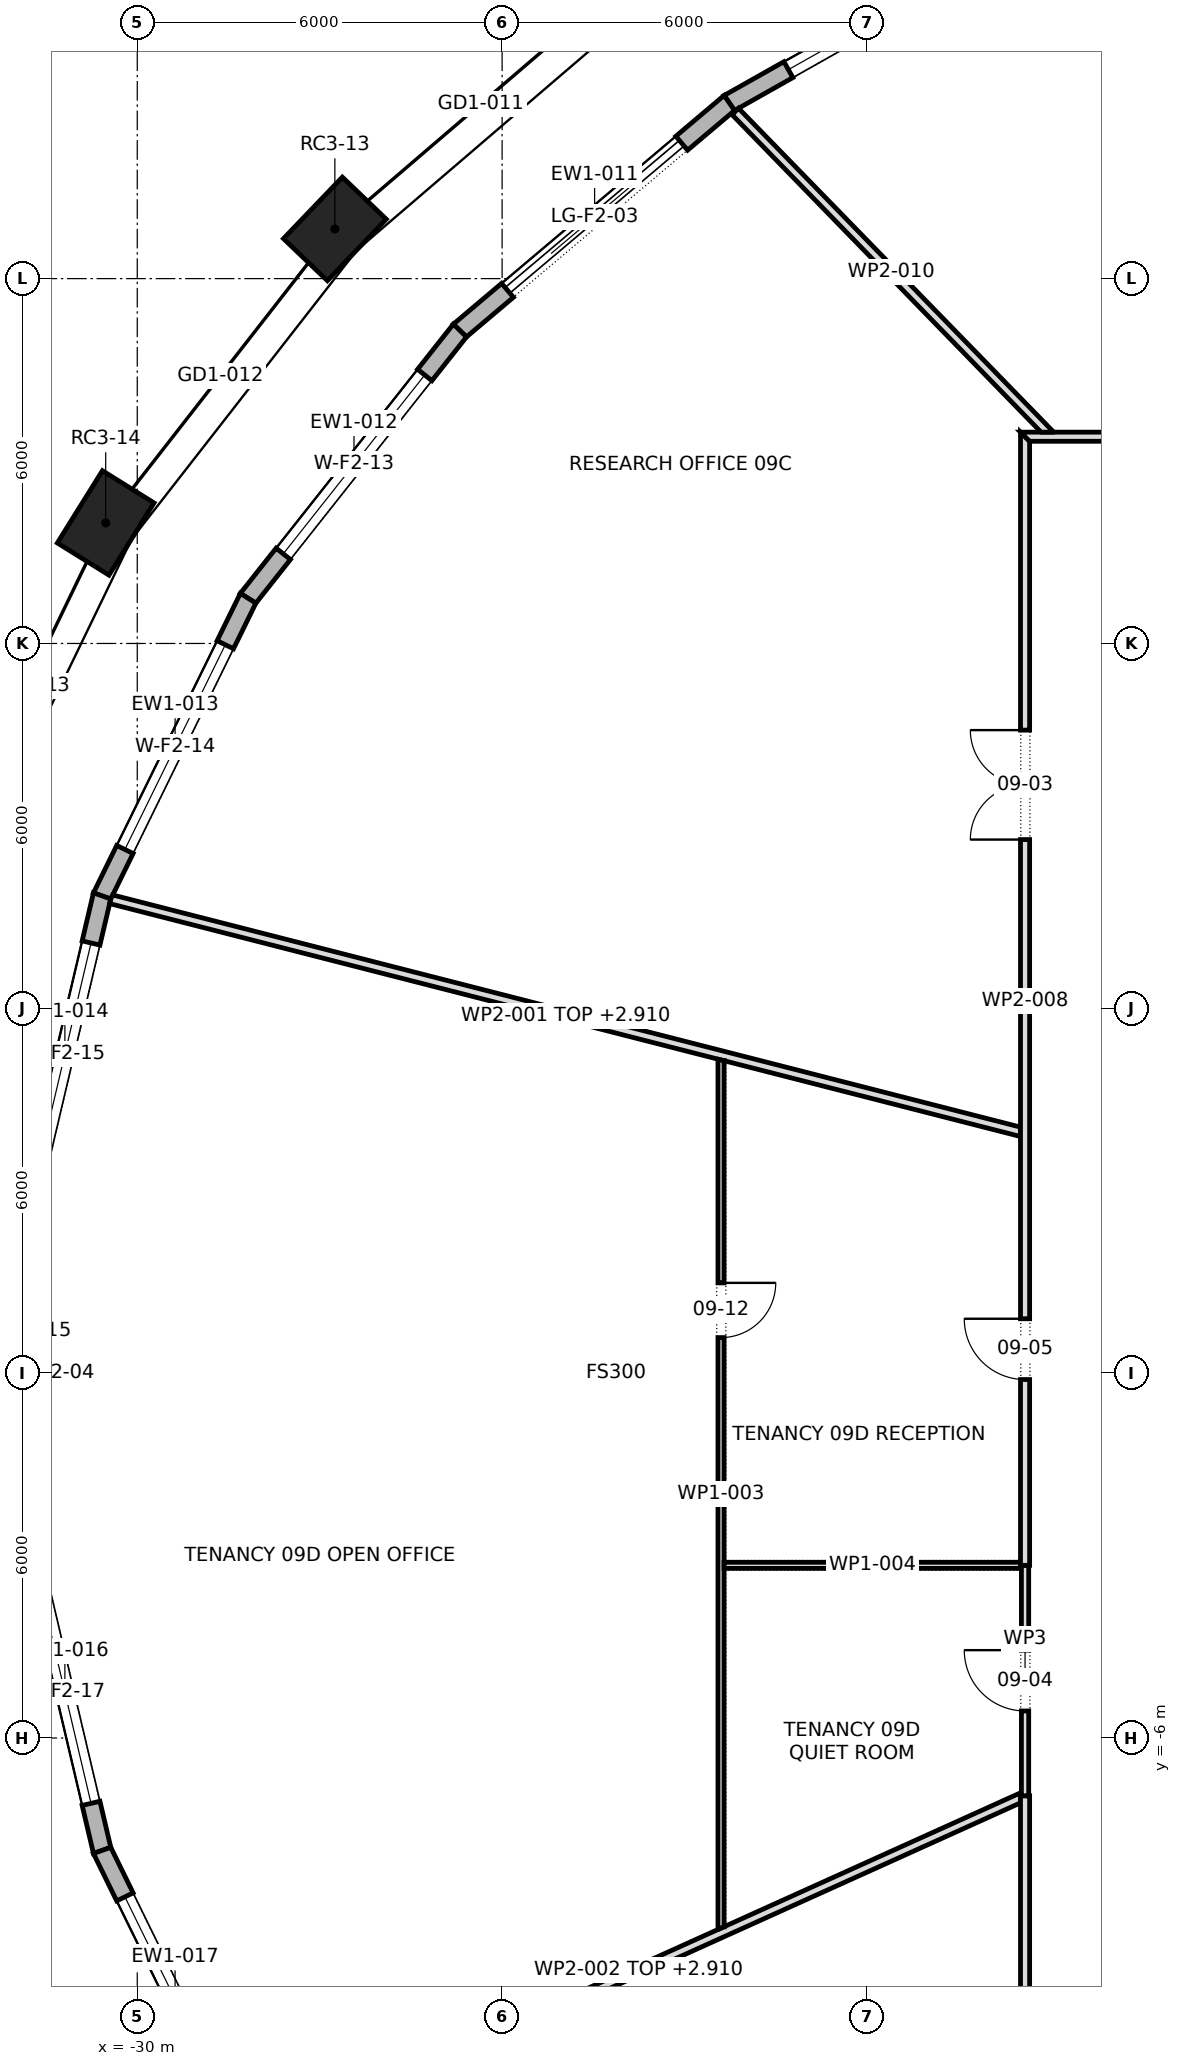
"""IFC4 building model, lengths in metres.
Left out: names, types, materials, properties, quantities, classifications, styles, units other than length and angle.
Written with IfcOpenShell. Run it as: python <this file> out.ifc"""

import sys

from ifc_helpers import new_model, si_unit, direction, frame, frame_2d, origin, origin_2d, place, context, subcontext, project, spatial, polyline, rectangle, outline, extrude, element, fill, save


model = new_model("IFC4")
c1 = context("Model", 3, precision=1e-05, world=origin(), true_north=direction((0.0, 1.0)))
c2 = subcontext(c1, "Body", "Model", "MODEL_VIEW")
j1 = project(units=[si_unit("LENGTHUNIT", "METRE"), si_unit("PLANEANGLEUNIT", "RADIAN")], contexts=[c1])
p1 = place(None, origin())
s1 = spatial("IfcSite", under=j1, at=p1, CompositionType="ELEMENT")
p2 = place(p1, origin())
s2 = spatial("IfcBuilding", under=s1, at=p2, CompositionType="ELEMENT")
p3 = place(p2, frame((0.0, 0.0, 129.7)))
s3 = spatial("IfcBuildingStorey", under=s2, at=p3, CompositionType="ELEMENT", Elevation=129.7)
for number, where, z_axis, x_axis in (
    (1, (-26.75, 18.817, 0.0), (0.0, 0.0, 1.0), (-0.692, -0.722, 0.0)),
    (2, (-30.519, 13.982, 0.0), (0.0, 0.0, 1.0), (-0.529, -0.849, 0.0)),
):
    element("IfcColumn", number, at=place(p3, frame(where, z_axis=z_axis, x_axis=x_axis)), inside=s3, PredefinedType="COLUMN", context=c2, shape_type="SweptSolid", body=[
        extrude(rectangle(XDim=1.4, YDim=1.0, at=origin_2d()), origin(), (0.0, 0.0, 1.0), 4.2),
    ])
p4 = place(p3, frame((-15.055, 23.827, 0.0), z_axis=(0.0, 0.0, 1.0), x_axis=(-0.87090857883, -0.491445060327, 0.0)))
e3 = element("IfcWall", 3, at=p4, inside=s3, PredefinedType="STANDARD", context=c2, shape_type="SweptSolid", body=[
    extrude(outline(polyline([(-0.013, -0.15), (5.994, -0.15), (5.966, 0.15), (0.013, 0.15), (-0.013, -0.15)])), origin(), (0.0, 0.0, 1.0), 3.9),
])
p5 = place(p4, frame((1.115, 0.0, 0.6)))
e4 = element("IfcOpeningElement", 4, at=p5, cuts=e3, PredefinedType="OPENING", context=c2, shape_type="SweptSolid", body=[
    extrude(rectangle(XDim=3.75, YDim=2.85, at=frame_2d((1.875, 1.425))), frame((0.0, 0.162, 0.0), z_axis=(0.0, -1.0, 0.0), x_axis=(1.0, 0.0, 0.0)), (0.0, 0.0, 1.0), 0.324),
])
p6 = place(p3, frame((-20.263, 20.888, 0.0), z_axis=(0.0, 0.0, 1.0), x_axis=(-0.763963973896, -0.645258898884, 0.0)))
e5 = element("IfcWall", 5, at=p6, inside=s3, PredefinedType="STANDARD", context=c2, shape_type="SweptSolid", body=[
    extrude(outline(polyline([(-0.014, -0.15), (5.815, -0.15), (5.785, 0.15), (0.014, 0.15), (-0.014, -0.15)])), origin(), (0.0, 0.0, 1.0), 3.9),
])
p7 = place(p6, frame((1.025, 0.0, 0.0)))
e6 = element("IfcOpeningElement", 6, at=p7, cuts=e5, PredefinedType="OPENING", context=c2, shape_type="SweptSolid", body=[
    extrude(rectangle(XDim=3.75, YDim=3.45, at=frame_2d((1.875, 1.725))), frame((0.0, 0.162, 0.0), z_axis=(0.0, -1.0, 0.0), x_axis=(1.0, 0.0, 0.0)), (0.0, 0.0, 1.0), 0.324),
])
p8 = place(p3, frame((-24.694, 17.146, 0.0), z_axis=(0.0, 0.0, 1.0), x_axis=(-0.620464552431, -0.784234492468, 0.0)))
e7 = element("IfcWall", 7, at=p8, inside=s3, PredefinedType="STANDARD", context=c2, shape_type="SweptSolid", body=[
    extrude(outline(polyline([(-0.015, -0.15), (5.63, -0.15), (5.598, 0.15), (0.015, 0.15), (-0.015, -0.15)])), origin(), (0.0, 0.0, 1.0), 3.9),
])
p9 = place(p8, frame((0.932, 0.0, 0.6)))
e8 = element("IfcOpeningElement", 8, at=p9, cuts=e7, PredefinedType="OPENING", context=c2, shape_type="SweptSolid", body=[
    extrude(rectangle(XDim=3.75, YDim=2.85, at=frame_2d((1.875, 1.425))), frame((0.0, 0.162, 0.0), z_axis=(0.0, -1.0, 0.0), x_axis=(1.0, 0.0, 0.0)), (0.0, 0.0, 1.0), 0.324),
])
p10 = place(p3, frame((-28.177, 12.743, 0.0), z_axis=(0.0, 0.0, 1.0), x_axis=(-0.440321465864, -0.897840189956, 0.0)))
e9 = element("IfcWall", 9, at=p10, inside=s3, PredefinedType="STANDARD", context=c2, shape_type="SweptSolid", body=[
    extrude(outline(polyline([(-0.016, -0.15), (5.468, -0.15), (5.435, 0.15), (0.016, 0.15), (-0.016, -0.15)])), origin(), (0.0, 0.0, 1.0), 3.9),
])
p11 = place(p10, frame((0.851, 0.0, 0.6)))
e10 = element("IfcOpeningElement", 10, at=p11, cuts=e9, PredefinedType="OPENING", context=c2, shape_type="SweptSolid", body=[
    extrude(rectangle(XDim=3.75, YDim=2.85, at=frame_2d((1.875, 1.425))), frame((0.0, 0.162, 0.0), z_axis=(0.0, -1.0, 0.0), x_axis=(1.0, 0.0, 0.0)), (0.0, 0.0, 1.0), 0.324),
])
p12 = place(p3, frame((-30.578, 7.848, 0.0), z_axis=(0.0, 0.0, 1.0), x_axis=(-0.229227895667, -0.973372781543, 0.0)))
e11 = element("IfcWall", 11, at=p12, inside=s3, PredefinedType="STANDARD", context=c2, shape_type="SweptSolid", body=[
    extrude(outline(polyline([(-0.017, -0.15), (5.357, -0.15), (5.323, 0.15), (0.017, 0.15), (-0.017, -0.15)])), origin(), (0.0, 0.0, 1.0), 3.9),
])
p13 = place(p12, frame((0.795, 0.0, 0.6)))
e12 = element("IfcOpeningElement", 12, at=p13, cuts=e11, PredefinedType="OPENING", context=c2, shape_type="SweptSolid", body=[
    extrude(rectangle(XDim=3.75, YDim=2.85, at=frame_2d((1.875, 1.425))), frame((0.0, 0.162, 0.0), z_axis=(0.0, -1.0, 0.0), x_axis=(1.0, 0.0, 0.0)), (0.0, 0.0, 1.0), 0.324),
])
p14 = place(p3, frame((-31.802, -2.65, 0.0), z_axis=(0.0, 0.0, 1.0), x_axis=(0.229227895667, -0.973372781543, 0.0)))
e13 = element("IfcWall", 13, at=p14, inside=s3, PredefinedType="STANDARD", context=c2, shape_type="SweptSolid", body=[
    extrude(outline(polyline([(-0.017, -0.15), (5.357, -0.15), (5.323, 0.15), (0.017, 0.15), (-0.017, -0.15)])), origin(), (0.0, 0.0, 1.0), 3.9),
])
p15 = place(p14, frame((0.795, 0.0, 0.6)))
e14 = element("IfcOpeningElement", 14, at=p15, cuts=e13, PredefinedType="OPENING", context=c2, shape_type="SweptSolid", body=[
    extrude(rectangle(XDim=3.75, YDim=2.85, at=frame_2d((1.875, 1.425))), frame((0.0, 0.162, 0.0), z_axis=(0.0, -1.0, 0.0), x_axis=(1.0, 0.0, 0.0)), (0.0, 0.0, 1.0), 0.324),
])
p16 = place(p3, frame((-30.578, -7.848, 0.0), z_axis=(0.0, 0.0, 1.0), x_axis=(0.440321465864, -0.897840189956, 0.0)))
e15 = element("IfcWall", 15, at=p16, inside=s3, PredefinedType="STANDARD", context=c2, shape_type="SweptSolid", body=[
    extrude(outline(polyline([(-0.017, -0.15), (5.468, -0.15), (5.435, 0.15), (0.017, 0.15), (-0.017, -0.15)])), origin(), (0.0, 0.0, 1.0), 3.9),
])
p17 = place(p16, frame((0.851, 0.0, 0.6)))
e16 = element("IfcOpeningElement", 16, at=p17, cuts=e15, PredefinedType="OPENING", context=c2, shape_type="SweptSolid", body=[
    extrude(rectangle(XDim=3.75, YDim=2.85, at=frame_2d((1.875, 1.425))), frame((0.0, 0.162, 0.0), z_axis=(0.0, -1.0, 0.0), x_axis=(1.0, 0.0, 0.0)), (0.0, 0.0, 1.0), 0.324),
])
p18 = place(p3, frame((-30.435, 7.795, 0.0), z_axis=(0.0, 0.0, 1.0), x_axis=(0.968826155352, -0.247741560312, 0.0)))
e17 = element("IfcWall", 17, at=p18, inside=s3, PredefinedType="PARTITIONING", context=c2, shape_type="SweptSolid", body=[
    extrude(outline(polyline([(0.0, -0.075), (1.737, -0.075), (3.474, -0.075), (5.211, -0.075), (6.948, -0.075), (8.685, -0.075), (10.422, -0.075), (10.428, -0.073), (10.428, -0.075), (12.106, -0.075), (13.783, -0.075), (15.46, -0.075), (15.46, -0.073), (15.422, 0.075), (13.496, 0.075), (11.57, 0.075), (9.644, 0.075), (7.718, 0.075), (5.792, 0.075), (3.866, 0.075), (1.939, 0.075), (0.013, 0.075), (0.0, 0.01), (0.0, -0.075)])), origin(), (0.0, 0.0, 1.0), 2.91),
])
p19 = place(p3, frame((-28.052, -12.664, 0.0), z_axis=(0.0, 0.0, 1.0), x_axis=(0.911350334726, 0.411631591833, 0.0)))
e18 = element("IfcWall", 18, at=p19, inside=s3, PredefinedType="PARTITIONING", context=c2, shape_type="SweptSolid", body=[
    extrude(outline(polyline([(0.021, -0.075), (1.985, -0.075), (3.948, -0.075), (5.912, -0.075), (7.875, -0.075), (9.839, -0.075), (11.802, -0.075), (13.766, -0.075), (13.814, 0.031), (13.827, 0.025), (13.85, 0.074), (13.85, 0.075), (12.061, 0.075), (10.273, 0.075), (8.485, 0.075), (8.484, 0.073), (8.481, 0.075), (6.785, 0.075), (5.089, 0.075), (3.392, 0.075), (1.696, 0.075), (0.0, 0.075), (0.0, 0.074), (0.002, 0.001), (0.021, -0.075)])), origin(), (0.0, 0.0, 1.0), 2.91),
])
p20 = place(p3, frame((-20.4, -9.148, 0.0), z_axis=(0.0, 0.0, 1.0), x_axis=(0.0, 1.0, 0.0)))
e19 = element("IfcWall", 19, at=p20, inside=s3, PredefinedType="PARTITIONING", context=c2, shape_type="SweptSolid", body=[
    extrude(outline(polyline([(0.045, -0.05), (2.01, -0.05), (3.974, -0.05), (5.938, -0.05), (5.938, -0.05), (6.038, -0.05), (6.038, -0.05), (7.688, -0.05), (9.338, -0.05), (10.988, -0.05), (12.637, -0.05), (14.287, -0.05), (14.312, 0.049), (14.312, 0.05), (12.523, 0.05), (10.734, 0.05), (8.945, 0.05), (7.156, 0.05), (5.367, 0.05), (3.578, 0.05), (1.789, 0.05), (0.0, 0.05), (0.0, 0.05), (0.045, -0.05)])), origin(), (0.0, 0.0, 1.0), 3.9),
])
p21 = place(p20, frame((9.733, 0.0, 0.0)))
e20 = element("IfcOpeningElement", 20, at=p21, cuts=e19, PredefinedType="OPENING", context=c2, shape_type="SweptSolid", body=[
    extrude(rectangle(XDim=0.9, YDim=2.1, at=frame_2d((0.45, 1.05))), frame((0.0, 0.062, 0.0), z_axis=(0.0, -1.0, 0.0), x_axis=(1.0, 0.0, 0.0)), (0.0, 0.0, 1.0), 0.124),
])
p22 = place(p3, frame((-20.35, -3.16, 0.0), z_axis=(0.0, 0.0, 1.0), x_axis=(1.0, 0.0, 0.0)))
e21 = element("IfcWall", 21, at=p22, inside=s3, PredefinedType="PARTITIONING", context=c2, shape_type="SweptSolid", body=[
    extrude(outline(polyline([(4.89, -0.05), (4.89, 0.0), (4.875, 0.0), (4.875, 0.05), (3.25, 0.05), (1.625, 0.05), (0.0, 0.05), (0.0, -0.05), (1.63, -0.05), (3.26, -0.05), (4.89, -0.05)])), origin(), (0.0, 0.0, 1.0), 3.9),
])
p23 = place(p3, frame((-15.4, -15.475, 0.0), z_axis=(0.0, 0.0, 1.0), x_axis=(0.0, 1.0, 0.0)))
e22 = element("IfcWall", 22, at=p23, inside=s3, PredefinedType="PARTITIONING", context=c2, shape_type="SweptSolid", body=[
    extrude(outline(polyline([(8.525, 0.075), (6.82, 0.075), (5.115, 0.075), (3.41, 0.075), (1.705, 0.075), (0.0, 0.075), (0.15, -0.075), (1.825, -0.075), (3.5, -0.075), (5.175, -0.075), (6.85, -0.075), (8.525, -0.075), (8.525, 0.075)])), origin(), (0.0, 0.0, 1.0), 3.9),
])
p24 = place(p3, frame((-15.4, -6.95, 0.0), z_axis=(0.0, 0.0, 1.0), x_axis=(0.0, 1.0, 0.0)))
e23 = element("IfcWall", 23, at=p24, inside=s3, PredefinedType="PARTITIONING", context=c2, shape_type="SweptSolid", body=[
    extrude(rectangle(XDim=3.79, YDim=0.12, at=frame_2d((1.895, 0.0))), origin(), (0.0, 0.0, 1.0), 3.9),
])
p25 = place(p24, frame((1.395, 0.0, 0.0)))
e24 = element("IfcOpeningElement", 24, at=p25, cuts=e23, PredefinedType="OPENING", context=c2, shape_type="SweptSolid", body=[
    extrude(rectangle(XDim=1.0, YDim=2.1, at=frame_2d((0.5, 1.05))), frame((0.0, 0.072, 0.0), z_axis=(0.0, -1.0, 0.0), x_axis=(1.0, 0.0, 0.0)), (0.0, 0.0, 1.0), 0.144),
])
p26 = place(p3, frame((-15.4, -3.16, 0.0), z_axis=(0.0, 0.0, 1.0), x_axis=(0.0, 1.0, 0.0)))
e25 = element("IfcWall", 25, at=p26, inside=s3, PredefinedType="PARTITIONING", context=c2, shape_type="SweptSolid", body=[
    extrude(outline(polyline([(0.0, -0.075), (1.848, -0.075), (3.697, -0.075), (5.545, -0.075), (7.394, -0.075), (9.242, -0.075), (11.091, -0.075), (12.939, -0.075), (14.788, -0.075), (16.636, -0.075), (18.485, -0.075), (18.635, 0.075), (16.771, 0.075), (14.908, 0.075), (13.044, 0.075), (11.181, 0.075), (9.317, 0.075), (7.454, 0.075), (5.59, 0.075), (3.727, 0.075), (1.864, 0.075), (0.0, 0.075), (0.0, -0.075)])), origin(), (0.0, 0.0, 1.0), 3.9),
])
p27 = place(p26, frame((11.935, 0.0, 0.0)))
e26 = element("IfcOpeningElement", 26, at=p27, cuts=e25, PredefinedType="OPENING", context=c2, shape_type="SweptSolid", body=[
    extrude(rectangle(XDim=1.8, YDim=2.1, at=frame_2d((0.9, 1.05))), frame((0.0, 0.087, 0.0), z_axis=(0.0, -1.0, 0.0), x_axis=(1.0, 0.0, 0.0)), (0.0, 0.0, 1.0), 0.174),
])
p28 = place(p26, frame((3.055, 0.0, 0.0)))
e27 = element("IfcOpeningElement", 27, at=p28, cuts=e25, PredefinedType="OPENING", context=c2, shape_type="SweptSolid", body=[
    extrude(rectangle(XDim=1.0, YDim=2.1, at=frame_2d((0.5, 1.05))), frame((0.0, 0.087, 0.0), z_axis=(0.0, -1.0, 0.0), x_axis=(1.0, 0.0, 0.0)), (0.0, 0.0, 1.0), 0.174),
])
p29 = place(p3, frame((-15.475, 15.4, 0.0), z_axis=(0.0, 0.0, 1.0), x_axis=(1.0, 0.0, 0.0)))
e28 = element("IfcWall", 28, at=p29, inside=s3, PredefinedType="PARTITIONING", context=c2, shape_type="SweptSolid", body=[
    extrude(outline(polyline([(0.15, -0.075), (2.066, -0.075), (3.981, -0.075), (5.897, -0.075), (7.812, -0.075), (9.728, -0.075), (11.644, -0.075), (13.56, -0.075), (15.475, -0.075), (17.391, -0.075), (19.306, -0.075), (21.222, -0.075), (23.138, -0.075), (25.053, -0.075), (26.969, -0.075), (28.885, -0.075), (30.8, -0.075), (30.95, 0.075), (29.016, 0.075), (27.081, 0.075), (25.147, 0.075), (23.212, 0.075), (21.278, 0.075), (19.344, 0.075), (17.409, 0.075), (15.475, 0.075), (13.541, 0.075), (11.606, 0.075), (9.672, 0.075), (7.738, 0.075), (5.803, 0.075), (3.869, 0.075), (1.935, 0.075), (0.0, 0.075), (0.15, -0.075)])), origin(), (0.0, 0.0, 1.0), 3.9),
])
p30 = place(p29, frame((22.955, 0.0, 0.0)))
e29 = element("IfcOpeningElement", 29, at=p30, cuts=e28, PredefinedType="OPENING", context=c2, shape_type="SweptSolid", body=[
    extrude(rectangle(XDim=1.8, YDim=2.1, at=frame_2d((0.9, 1.05))), frame((0.0, 0.087, 0.0), z_axis=(0.0, -1.0, 0.0), x_axis=(1.0, 0.0, 0.0)), (0.0, 0.0, 1.0), 0.174),
])
p31 = place(p29, frame((7.995, 0.0, 0.0)))
e30 = element("IfcOpeningElement", 30, at=p31, cuts=e28, PredefinedType="OPENING", context=c2, shape_type="SweptSolid", body=[
    extrude(rectangle(XDim=1.8, YDim=2.1, at=frame_2d((0.9, 1.05))), frame((0.0, 0.087, 0.0), z_axis=(0.0, -1.0, 0.0), x_axis=(1.0, 0.0, 0.0)), (0.0, 0.0, 1.0), 0.174),
])
p32 = place(p3, frame((-14.982, 15.423, 0.0), z_axis=(0.0, 0.0, 1.0), x_axis=(-0.69739829169, 0.716683767604, 0.0)))
e31 = element("IfcWall", 31, at=p32, inside=s3, PredefinedType="PARTITIONING", context=c2, shape_type="SweptSolid", body=[
    extrude(outline(polyline([(7.431, 0.075), (5.61, 0.075), (3.788, 0.075), (1.967, 0.075), (0.146, 0.075), (0.0, -0.075), (0.0, -0.075), (1.858, -0.075), (3.715, -0.075), (5.573, -0.075), (7.431, -0.075), (7.431, 0.075)])), origin(), (0.0, 0.0, 1.0), 3.9),
])
p33 = place(p5, origin())
e32 = element("IfcWindow", 32, at=p33, inside=s3, PartitioningType="TRIPLE_PANEL_VERTICAL", PredefinedType="WINDOW", context=c2, shape_type="SweptSolid", body=[
    extrude(rectangle(XDim=3.75, YDim=2.85, at=frame_2d((1.875, 1.425))), frame((0.0, 0.03, 0.0), z_axis=(0.0, -1.0, 0.0), x_axis=(1.0, 0.0, 0.0)), (0.0, 0.0, 1.0), 0.06),
])
fill(e4, e32)
p34 = place(p7, origin())
e33 = element("IfcDoor", 33, at=p34, inside=s3, OperationType="DOUBLE_DOOR_SLIDING", PredefinedType="DOOR", context=c2, shape_type="SweptSolid", body=[
    extrude(rectangle(XDim=3.75, YDim=3.45, at=frame_2d((1.875, 1.725))), frame((0.0, 0.025, 0.0), z_axis=(0.0, -1.0, 0.0), x_axis=(1.0, 0.0, 0.0)), (0.0, 0.0, 1.0), 0.05),
])
fill(e6, e33)
p35 = place(p9, origin())
e34 = element("IfcWindow", 34, at=p35, inside=s3, PartitioningType="TRIPLE_PANEL_VERTICAL", PredefinedType="WINDOW", context=c2, shape_type="SweptSolid", body=[
    extrude(rectangle(XDim=3.75, YDim=2.85, at=frame_2d((1.875, 1.425))), frame((0.0, 0.03, 0.0), z_axis=(0.0, -1.0, 0.0), x_axis=(1.0, 0.0, 0.0)), (0.0, 0.0, 1.0), 0.06),
])
fill(e8, e34)
p36 = place(p11, origin())
e35 = element("IfcWindow", 35, at=p36, inside=s3, PartitioningType="TRIPLE_PANEL_VERTICAL", PredefinedType="WINDOW", context=c2, shape_type="SweptSolid", body=[
    extrude(rectangle(XDim=3.75, YDim=2.85, at=frame_2d((1.875, 1.425))), frame((0.0, 0.03, 0.0), z_axis=(0.0, -1.0, 0.0), x_axis=(1.0, 0.0, 0.0)), (0.0, 0.0, 1.0), 0.06),
])
fill(e10, e35)
p37 = place(p13, origin())
e36 = element("IfcWindow", 36, at=p37, inside=s3, PartitioningType="TRIPLE_PANEL_VERTICAL", PredefinedType="WINDOW", context=c2, shape_type="SweptSolid", body=[
    extrude(rectangle(XDim=3.75, YDim=2.85, at=frame_2d((1.875, 1.425))), frame((0.0, 0.03, 0.0), z_axis=(0.0, -1.0, 0.0), x_axis=(1.0, 0.0, 0.0)), (0.0, 0.0, 1.0), 0.06),
])
fill(e12, e36)
p38 = place(p15, origin())
e37 = element("IfcWindow", 37, at=p38, inside=s3, PartitioningType="TRIPLE_PANEL_VERTICAL", PredefinedType="WINDOW", context=c2, shape_type="SweptSolid", body=[
    extrude(rectangle(XDim=3.75, YDim=2.85, at=frame_2d((1.875, 1.425))), frame((0.0, 0.03, 0.0), z_axis=(0.0, -1.0, 0.0), x_axis=(1.0, 0.0, 0.0)), (0.0, 0.0, 1.0), 0.06),
])
fill(e14, e37)
p39 = place(p17, origin())
e38 = element("IfcWindow", 38, at=p39, inside=s3, PartitioningType="TRIPLE_PANEL_VERTICAL", PredefinedType="WINDOW", context=c2, shape_type="SweptSolid", body=[
    extrude(rectangle(XDim=3.75, YDim=2.85, at=frame_2d((1.875, 1.425))), frame((0.0, 0.03, 0.0), z_axis=(0.0, -1.0, 0.0), x_axis=(1.0, 0.0, 0.0)), (0.0, 0.0, 1.0), 0.06),
])
fill(e16, e38)
p40 = place(p27, origin())
e39 = element("IfcDoor", 39, at=p40, inside=s3, OperationType="DOUBLE_DOOR_SINGLE_SWING", PredefinedType="DOOR", context=c2, shape_type="SweptSolid", body=[
    extrude(rectangle(XDim=1.8, YDim=2.1, at=frame_2d((0.9, 1.05))), frame((0.0, 0.025, 0.0), z_axis=(0.0, -1.0, 0.0), x_axis=(1.0, 0.0, 0.0)), (0.0, 0.0, 1.0), 0.05),
])
fill(e26, e39)
p41 = place(p25, origin())
e40 = element("IfcDoor", 40, at=p41, inside=s3, OperationType="SINGLE_SWING_LEFT", PredefinedType="DOOR", context=c2, shape_type="SweptSolid", body=[
    extrude(rectangle(XDim=1.0, YDim=2.1, at=frame_2d((0.5, 1.05))), frame((0.0, 0.025, 0.0), z_axis=(0.0, -1.0, 0.0), x_axis=(1.0, 0.0, 0.0)), (0.0, 0.0, 1.0), 0.05),
])
fill(e24, e40)
p42 = place(p28, origin())
e41 = element("IfcDoor", 41, at=p42, inside=s3, OperationType="SINGLE_SWING_LEFT", PredefinedType="DOOR", context=c2, shape_type="SweptSolid", body=[
    extrude(rectangle(XDim=1.0, YDim=2.1, at=frame_2d((0.5, 1.05))), frame((0.0, 0.025, 0.0), z_axis=(0.0, -1.0, 0.0), x_axis=(1.0, 0.0, 0.0)), (0.0, 0.0, 1.0), 0.05),
])
fill(e27, e41)
p43 = place(p21, frame((0.9, 0.0, 0.0), z_axis=(0.0, 0.0, 1.0), x_axis=(-1.0, 0.0, 0.0)))
e42 = element("IfcDoor", 42, at=p43, inside=s3, OperationType="SINGLE_SWING_RIGHT", PredefinedType="DOOR", context=c2, shape_type="SweptSolid", body=[
    extrude(rectangle(XDim=0.9, YDim=2.1, at=frame_2d((0.45, 1.05))), frame((0.0, 0.025, 0.0), z_axis=(0.0, -1.0, 0.0), x_axis=(1.0, 0.0, 0.0)), (0.0, 0.0, 1.0), 0.05),
])
fill(e20, e42)
save(model, sys.argv[1])
